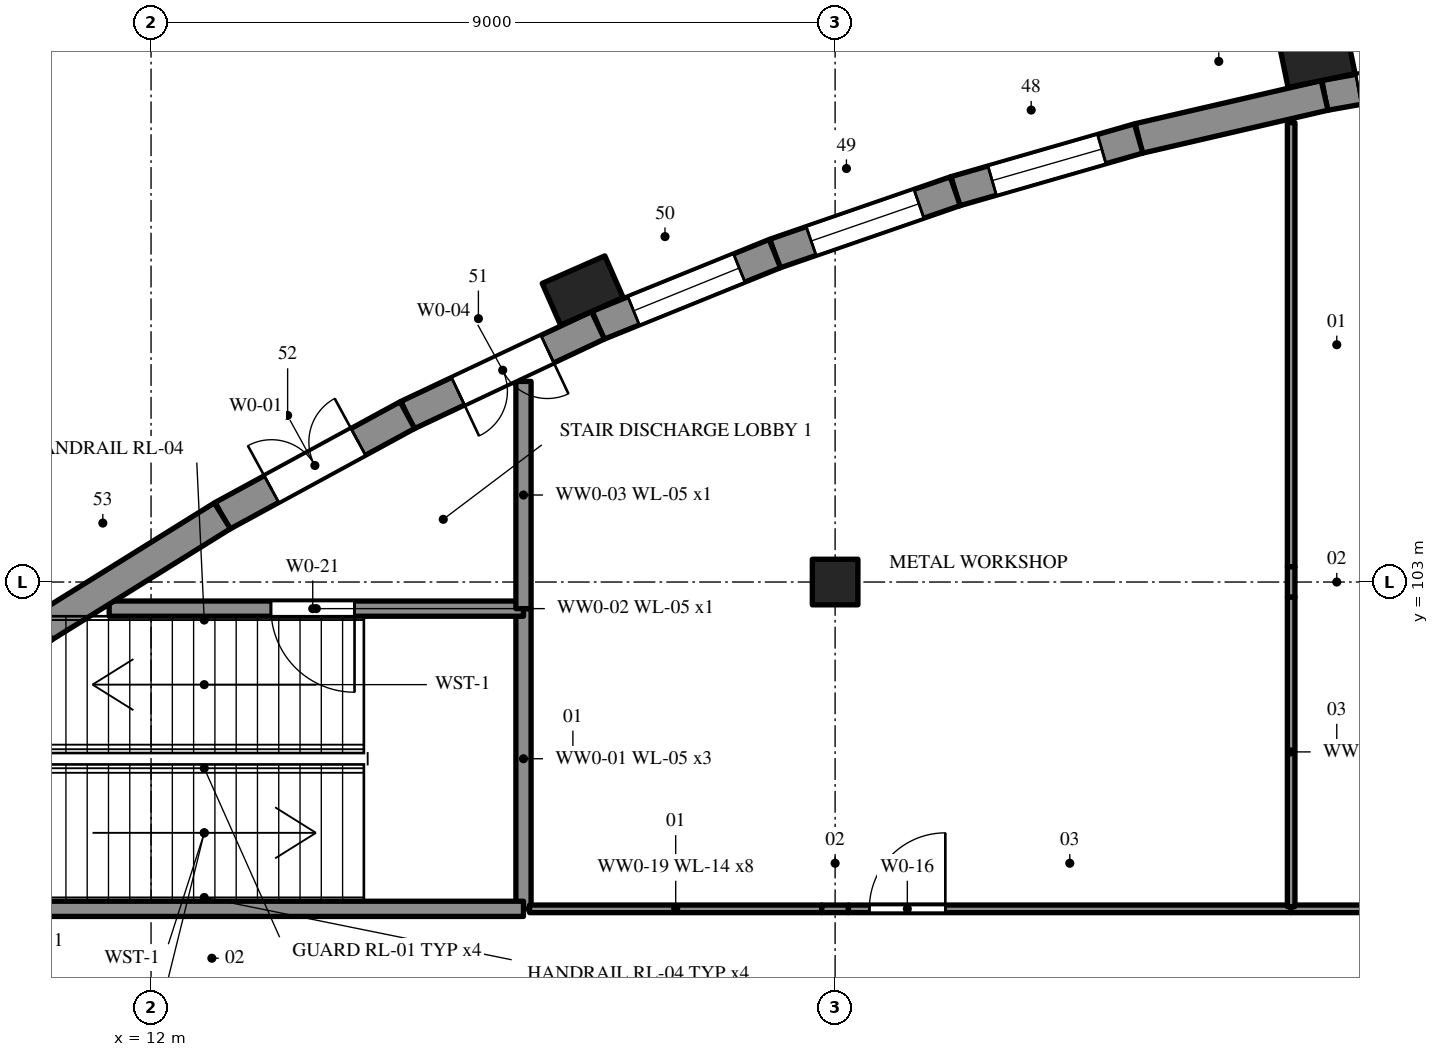
"""IFC4 building model, lengths in metres.
Left out: names, types, materials, properties, quantities, classifications, styles, units other than length and angle.
Written with IfcOpenShell. Run it as: python <this file> out.ifc"""

import sys

from ifc_helpers import new_model, si_unit, direction, frame, frame_2d, origin, origin_2d, place, context, subcontext, project, spatial, rectangle, extrude, element, fill, save


model = new_model("IFC4")
c1 = context("Model", 3, precision=1e-05, world=origin(), true_north=direction((0.0, 1.0)))
c2 = subcontext(c1, "Body", "Model", "MODEL_VIEW")
j1 = project(units=[si_unit("LENGTHUNIT", "METRE"), si_unit("PLANEANGLEUNIT", "RADIAN")], contexts=[c1])
p1 = place(None, origin())
s1 = spatial("IfcSite", under=j1, at=p1, CompositionType="ELEMENT")
p2 = place(p1, origin())
s2 = spatial("IfcBuilding", under=s1, at=p2, CompositionType="ELEMENT")
p3 = place(p2, origin())
s3 = spatial("IfcBuildingStorey", under=s2, at=p3, CompositionType="ELEMENT", Elevation=0.0)
p4 = place(p3, frame((21.0, 103.0, -0.25), z_axis=(0.0, 0.0, 1.0), x_axis=(1.0, 0.0, 0.0)))
e1 = element("IfcColumn", 1, at=p4, inside=s3, PredefinedType="COLUMN", context=c2, shape_type="SweptSolid", body=[
    extrude(rectangle(XDim=0.6, YDim=0.6, at=origin_2d()), origin(), (0.0, 0.0, 1.0), 5.37),
])
p5 = place(p3, frame((16.9, 102.65, -0.25), z_axis=(0.0, 0.0, 1.0), x_axis=(0.0, -1.0, 0.0)))
e2 = element("IfcWall", 2, at=p5, inside=s3, PredefinedType="SHEAR", context=c2, shape_type="SweptSolid", body=[
    extrude(rectangle(XDim=3.95, YDim=0.2, at=frame_2d((1.975, 0.0))), origin(), (0.0, 0.0, 1.0), 5.65),
])
p6 = place(p3, frame((16.9, 98.7, -0.25), z_axis=(0.0, 0.0, 1.0), x_axis=(-1.0, 0.0, 0.0)))
e3 = element("IfcWall", 3, at=p6, inside=s3, PredefinedType="SHEAR", context=c2, shape_type="SweptSolid", body=[
    extrude(rectangle(XDim=8.2, YDim=0.2, at=frame_2d((4.1, 0.0))), origin(), (0.0, 0.0, 1.0), 5.65),
])
p7 = place(p6, frame((6.95, 0.0, 0.25)))
e4 = element("IfcOpeningElement", 4, at=p7, cuts=e3, PredefinedType="OPENING", context=c2, shape_type="SweptSolid", body=[
    extrude(rectangle(XDim=1.0, YDim=2.4, at=frame_2d((0.5, 1.2))), frame((0.0, 0.11, 0.0), z_axis=(0.0, -1.0, 0.0), x_axis=(1.0, 0.0, 0.0)), (0.0, 0.0, 1.0), 0.22),
])
p8 = place(p3, frame((11.449, 102.65, -0.25), z_axis=(0.0, 0.0, 1.0), x_axis=(1.0, 0.0, 0.0)))
e5 = element("IfcWall", 5, at=p8, inside=s3, PredefinedType="SHEAR", context=c2, shape_type="SweptSolid", body=[
    extrude(rectangle(XDim=5.451, YDim=0.2, at=frame_2d((2.726, 0.0))), origin(), (0.0, 0.0, 1.0), 5.65),
])
p9 = place(p8, frame((2.128, 0.0, 0.25)))
e6 = element("IfcOpeningElement", 6, at=p9, cuts=e5, PredefinedType="OPENING", context=c2, shape_type="SweptSolid", body=[
    extrude(rectangle(XDim=1.1, YDim=2.1, at=frame_2d((0.55, 1.05))), frame((0.0, 0.11, 0.0), z_axis=(0.0, -1.0, 0.0), x_axis=(1.0, 0.0, 0.0)), (0.0, 0.0, 1.0), 0.22),
])
p10 = place(p3, frame((16.9, 105.64, -0.25), z_axis=(0.0, 0.0, 1.0), x_axis=(0.0, -1.0, 0.0)))
e7 = element("IfcWall", 7, at=p10, inside=s3, PredefinedType="SHEAR", context=c2, shape_type="SweptSolid", body=[
    extrude(rectangle(XDim=2.99, YDim=0.2, at=frame_2d((1.495, 0.0))), origin(), (0.0, 0.0, 1.0), 5.65),
])
p11 = place(p3, frame((29.809, 109.825, -0.25), z_axis=(0.0, 0.0, 1.0), x_axis=(-0.984524011381, -0.175249738987, 0.0)))
e8 = element("IfcWall", 8, at=p11, inside=s3, PredefinedType="SOLIDWALL", context=c2, shape_type="SweptSolid", body=[
    extrude(rectangle(XDim=2.406, YDim=0.4, at=frame_2d((1.203, 0.0))), origin(), (0.0, 0.0, 1.0), 5.65),
])
p12 = place(p11, frame((0.453, 0.0, 1.15)))
e9 = element("IfcOpeningElement", 9, at=p12, cuts=e8, PredefinedType="OPENING", context=c2, shape_type="SweptSolid", body=[
    extrude(rectangle(XDim=1.5, YDim=2.1, at=frame_2d((0.75, 1.05))), frame((0.0, 0.21, 0.0), z_axis=(0.0, -1.0, 0.0), x_axis=(1.0, 0.0, 0.0)), (0.0, 0.0, 1.0), 0.42),
])
p13 = place(p3, frame((27.44, 109.403, -0.25), z_axis=(0.0, 0.0, 1.0), x_axis=(-0.974189274843, -0.225732710925, 0.0)))
e10 = element("IfcWall", 10, at=p13, inside=s3, PredefinedType="SOLIDWALL", context=c2, shape_type="SweptSolid", body=[
    extrude(rectangle(XDim=2.511, YDim=0.4, at=frame_2d((1.256, 0.0))), origin(), (0.0, 0.0, 1.0), 5.65),
])
p14 = place(p3, frame((24.994, 108.836, -0.25), z_axis=(0.0, 0.0, 1.0), x_axis=(-0.961008605775, -0.276518461637, 0.0)))
e11 = element("IfcWall", 11, at=p14, inside=s3, PredefinedType="SOLIDWALL", context=c2, shape_type="SweptSolid", body=[
    extrude(rectangle(XDim=2.511, YDim=0.4, at=frame_2d((1.255, 0.0))), origin(), (0.0, 0.0, 1.0), 5.65),
])
p15 = place(p14, frame((0.506, 0.0, 1.15)))
e12 = element("IfcOpeningElement", 12, at=p15, cuts=e11, PredefinedType="OPENING", context=c2, shape_type="SweptSolid", body=[
    extrude(rectangle(XDim=1.5, YDim=2.1, at=frame_2d((0.75, 1.05))), frame((0.0, 0.21, 0.0), z_axis=(0.0, -1.0, 0.0), x_axis=(1.0, 0.0, 0.0)), (0.0, 0.0, 1.0), 0.42),
])
p16 = place(p3, frame((22.581, 108.142, -0.25), z_axis=(0.0, 0.0, 1.0), x_axis=(-0.945175475032, -0.326562890417, 0.0)))
e13 = element("IfcWall", 13, at=p16, inside=s3, PredefinedType="SOLIDWALL", context=c2, shape_type="SweptSolid", body=[
    extrude(rectangle(XDim=2.511, YDim=0.4, at=frame_2d((1.256, 0.0))), origin(), (0.0, 0.0, 1.0), 5.65),
])
p17 = place(p16, frame((0.506, 0.0, 1.15)))
e14 = element("IfcOpeningElement", 14, at=p17, cuts=e13, PredefinedType="OPENING", context=c2, shape_type="SweptSolid", body=[
    extrude(rectangle(XDim=1.5, YDim=2.1, at=frame_2d((0.75, 1.05))), frame((0.0, 0.21, 0.0), z_axis=(0.0, -1.0, 0.0), x_axis=(1.0, 0.0, 0.0)), (0.0, 0.0, 1.0), 0.42),
])
p18 = place(p3, frame((20.207, 107.322, -0.25), z_axis=(0.0, 0.0, 1.0), x_axis=(-0.926688932252, -0.375829246921, 0.0)))
e15 = element("IfcWall", 15, at=p18, inside=s3, PredefinedType="SOLIDWALL", context=c2, shape_type="SweptSolid", body=[
    extrude(rectangle(XDim=2.511, YDim=0.4, at=frame_2d((1.255, 0.0))), origin(), (0.0, 0.0, 1.0), 5.65),
])
p19 = place(p18, frame((0.505, 0.0, 1.15)))
e16 = element("IfcOpeningElement", 16, at=p19, cuts=e15, PredefinedType="OPENING", context=c2, shape_type="SweptSolid", body=[
    extrude(rectangle(XDim=1.5, YDim=2.1, at=frame_2d((0.75, 1.05))), frame((0.0, 0.21, 0.0), z_axis=(0.0, -1.0, 0.0), x_axis=(1.0, 0.0, 0.0)), (0.0, 0.0, 1.0), 0.42),
])
p20 = place(p3, frame((17.88, 106.378, -0.25), z_axis=(0.0, 0.0, 1.0), x_axis=(-0.904561064695, -0.42634408667, 0.0)))
e17 = element("IfcWall", 17, at=p20, inside=s3, PredefinedType="SOLIDWALL", context=c2, shape_type="SweptSolid", body=[
    extrude(rectangle(XDim=2.772, YDim=0.4, at=frame_2d((1.386, 0.0))), origin(), (0.0, 0.0, 1.0), 5.65),
])
p21 = place(p20, frame((0.736, 0.0, 0.25)))
e18 = element("IfcOpeningElement", 18, at=p21, cuts=e17, PredefinedType="OPENING", context=c2, shape_type="SweptSolid", body=[
    extrude(rectangle(XDim=1.3, YDim=2.1, at=frame_2d((0.65, 1.05))), frame((0.0, 0.21, 0.0), z_axis=(0.0, -1.0, 0.0), x_axis=(1.0, 0.0, 0.0)), (0.0, 0.0, 1.0), 0.42),
])
p22 = place(p3, frame((15.373, 105.196, -0.25), z_axis=(0.0, 0.0, 1.0), x_axis=(-0.878255502871, -0.478191668347, 0.0)))
e19 = element("IfcWall", 19, at=p22, inside=s3, PredefinedType="SOLIDWALL", context=c2, shape_type="SweptSolid", body=[
    extrude(rectangle(XDim=2.772, YDim=0.4, at=frame_2d((1.386, 0.0))), origin(), (0.0, 0.0, 1.0), 5.65),
])
p23 = place(p22, frame((0.736, 0.0, 0.25)))
e20 = element("IfcOpeningElement", 20, at=p23, cuts=e19, PredefinedType="OPENING", context=c2, shape_type="SweptSolid", body=[
    extrude(rectangle(XDim=1.3, YDim=2.1, at=frame_2d((0.65, 1.05))), frame((0.0, 0.21, 0.0), z_axis=(0.0, -1.0, 0.0), x_axis=(1.0, 0.0, 0.0)), (0.0, 0.0, 1.0), 0.42),
])
p24 = place(p3, frame((12.938, 103.871, -0.25), z_axis=(0.0, 0.0, 1.0), x_axis=(-0.84912946359, -0.528184772653, 0.0)))
e21 = element("IfcWall", 21, at=p24, inside=s3, PredefinedType="SOLIDWALL", context=c2, shape_type="SweptSolid", body=[
    extrude(rectangle(XDim=2.772, YDim=0.4, at=frame_2d((1.386, 0.0))), origin(), (0.0, 0.0, 1.0), 5.65),
])
for number, where, z_axis, x_axis in (
    (22, (17.679, 106.836, -0.25), (0.0, 0.0, 1.0), (-0.915, -0.403, 0.0)),
    (23, (27.34, 109.893, -0.25), (0.0, 0.0, 1.0), (-0.98, -0.201, 0.0)),
):
    element("IfcColumn", number, at=place(p3, frame(where, z_axis=z_axis, x_axis=x_axis)), inside=s3, PredefinedType="PILASTER", context=c2, shape_type="SweptSolid", body=[
        extrude(rectangle(XDim=0.9, YDim=0.6, at=origin_2d()), origin(), (0.0, 0.0, 1.0), 5.65),
    ])
p25 = place(p3, frame((16.98, 98.7, 0.0), z_axis=(0.0, 0.0, 1.0), x_axis=(1.0, 0.0, 0.0)))
e24 = element("IfcWall", 24, at=p25, inside=s3, PredefinedType="PARTITIONING", context=c2, shape_type="SweptSolid", body=[
    extrude(rectangle(XDim=3.845, YDim=0.1, at=frame_2d((1.922, 0.0))), origin(), (0.0, 0.0, 1.0), 5.12),
])
p26 = place(p3, frame((20.825, 98.7, 0.0), z_axis=(0.0, 0.0, 1.0), x_axis=(1.0, 0.0, 0.0)))
e25 = element("IfcWall", 25, at=p26, inside=s3, PredefinedType="PARTITIONING", context=c2, shape_type="SweptSolid", body=[
    extrude(rectangle(XDim=0.35, YDim=0.1, at=frame_2d((0.175, 0.0))), origin(), (0.0, 0.0, 1.0), 4.42),
])
p27 = place(p3, frame((21.175, 98.7, 0.0), z_axis=(0.0, 0.0, 1.0), x_axis=(1.0, 0.0, 0.0)))
e26 = element("IfcWall", 26, at=p27, inside=s3, PredefinedType="PARTITIONING", context=c2, shape_type="SweptSolid", body=[
    extrude(rectangle(XDim=5.825, YDim=0.1, at=frame_2d((2.913, 0.0))), origin(), (0.0, 0.0, 1.0), 5.12),
])
p28 = place(p27, frame((0.275, 0.0, 0.0)))
e27 = element("IfcOpeningElement", 27, at=p28, cuts=e26, PredefinedType="OPENING", context=c2, shape_type="SweptSolid", body=[
    extrude(rectangle(XDim=1.0, YDim=2.1, at=frame_2d((0.5, 1.05))), frame((0.0, 0.06, 0.0), z_axis=(0.0, -1.0, 0.0), x_axis=(1.0, 0.0, 0.0)), (0.0, 0.0, 1.0), 0.12),
])
p29 = place(p3, frame((27.0, 98.7, 0.0), z_axis=(0.0, 0.0, 1.0), x_axis=(1.0, 0.0, 0.0)))
e28 = element("IfcWall", 28, at=p29, inside=s3, PredefinedType="PARTITIONING", context=c2, shape_type="SweptSolid", body=[
    extrude(rectangle(XDim=2.825, YDim=0.1, at=frame_2d((1.413, 0.0))), origin(), (0.0, 0.0, 1.0), 5.12),
])
p30 = place(p3, frame((27.0, 109.044, 0.0), z_axis=(0.0, 0.0, 1.0), x_axis=(0.0, -1.0, 0.0)))
e29 = element("IfcWall", 29, at=p30, inside=s3, PredefinedType="PARTITIONING", context=c2, shape_type="SweptSolid", body=[
    extrude(rectangle(XDim=5.844, YDim=0.1, at=frame_2d((2.922, 0.0))), origin(), (0.0, 0.0, 1.0), 5.12),
])
p31 = place(p3, frame((27.0, 103.2, 0.0), z_axis=(0.0, 0.0, 1.0), x_axis=(0.0, -1.0, 0.0)))
e30 = element("IfcWall", 30, at=p31, inside=s3, PredefinedType="PARTITIONING", context=c2, shape_type="SweptSolid", body=[
    extrude(rectangle(XDim=0.4, YDim=0.1, at=frame_2d((0.2, 0.0))), origin(), (0.0, 0.0, 1.0), 4.32),
])
p32 = place(p3, frame((27.0, 102.8, 0.0), z_axis=(0.0, 0.0, 1.0), x_axis=(0.0, -1.0, 0.0)))
e31 = element("IfcWall", 31, at=p32, inside=s3, PredefinedType="PARTITIONING", context=c2, shape_type="SweptSolid", body=[
    extrude(rectangle(XDim=4.07, YDim=0.1, at=frame_2d((2.035, 0.0))), origin(), (0.0, 0.0, 1.0), 5.12),
])
p33 = place(p23, frame((1.3, 0.0, 0.0), z_axis=(0.0, 0.0, 1.0), x_axis=(-1.0, 0.0, 0.0)))
e32 = element("IfcDoor", 32, at=p33, inside=s3, OperationType="DOUBLE_DOOR_SINGLE_SWING", PredefinedType="DOOR", context=c2, shape_type="SweptSolid", body=[
    extrude(rectangle(XDim=1.3, YDim=2.1, at=frame_2d((0.65, 1.05))), frame((0.0, 0.025, 0.0), z_axis=(0.0, -1.0, 0.0), x_axis=(1.0, 0.0, 0.0)), (0.0, 0.0, 1.0), 0.05),
])
fill(e20, e32)
p34 = place(p21, origin())
e33 = element("IfcDoor", 33, at=p34, inside=s3, OperationType="DOUBLE_DOOR_SINGLE_SWING", PredefinedType="DOOR", context=c2, shape_type="SweptSolid", body=[
    extrude(rectangle(XDim=1.3, YDim=2.1, at=frame_2d((0.65, 1.05))), frame((0.0, 0.025, 0.0), z_axis=(0.0, -1.0, 0.0), x_axis=(1.0, 0.0, 0.0)), (0.0, 0.0, 1.0), 0.05),
])
fill(e18, e33)
p35 = place(p12, origin())
e34 = element("IfcWindow", 34, at=p35, inside=s3, PartitioningType="SINGLE_PANEL", PredefinedType="WINDOW", context=c2, shape_type="SweptSolid", body=[
    extrude(rectangle(XDim=1.5, YDim=2.1, at=frame_2d((0.75, 1.05))), frame((0.0, 0.03, 0.0), z_axis=(0.0, -1.0, 0.0), x_axis=(1.0, 0.0, 0.0)), (0.0, 0.0, 1.0), 0.06),
])
fill(e9, e34)
p36 = place(p15, origin())
e35 = element("IfcWindow", 35, at=p36, inside=s3, PartitioningType="SINGLE_PANEL", PredefinedType="WINDOW", context=c2, shape_type="SweptSolid", body=[
    extrude(rectangle(XDim=1.5, YDim=2.1, at=frame_2d((0.75, 1.05))), frame((0.0, 0.03, 0.0), z_axis=(0.0, -1.0, 0.0), x_axis=(1.0, 0.0, 0.0)), (0.0, 0.0, 1.0), 0.06),
])
fill(e12, e35)
p37 = place(p17, origin())
e36 = element("IfcWindow", 36, at=p37, inside=s3, PartitioningType="SINGLE_PANEL", PredefinedType="WINDOW", context=c2, shape_type="SweptSolid", body=[
    extrude(rectangle(XDim=1.5, YDim=2.1, at=frame_2d((0.75, 1.05))), frame((0.0, 0.03, 0.0), z_axis=(0.0, -1.0, 0.0), x_axis=(1.0, 0.0, 0.0)), (0.0, 0.0, 1.0), 0.06),
])
fill(e14, e36)
p38 = place(p19, origin())
e37 = element("IfcWindow", 37, at=p38, inside=s3, PartitioningType="SINGLE_PANEL", PredefinedType="WINDOW", context=c2, shape_type="SweptSolid", body=[
    extrude(rectangle(XDim=1.5, YDim=2.1, at=frame_2d((0.75, 1.05))), frame((0.0, 0.03, 0.0), z_axis=(0.0, -1.0, 0.0), x_axis=(1.0, 0.0, 0.0)), (0.0, 0.0, 1.0), 0.06),
])
fill(e16, e37)
p39 = place(p28, origin())
e38 = element("IfcDoor", 38, at=p39, inside=s3, OperationType="SINGLE_SWING_RIGHT", PredefinedType="DOOR", context=c2, shape_type="SweptSolid", body=[
    extrude(rectangle(XDim=1.0, YDim=2.1, at=frame_2d((0.5, 1.05))), frame((0.0, 0.025, 0.0), z_axis=(0.0, -1.0, 0.0), x_axis=(1.0, 0.0, 0.0)), (0.0, 0.0, 1.0), 0.05),
])
fill(e27, e38)
p40 = place(p9, frame((1.1, 0.0, 0.0), z_axis=(0.0, 0.0, 1.0), x_axis=(-1.0, 0.0, 0.0)))
e39 = element("IfcDoor", 39, at=p40, inside=s3, OperationType="SINGLE_SWING_LEFT", PredefinedType="DOOR", context=c2, shape_type="SweptSolid", body=[
    extrude(rectangle(XDim=1.1, YDim=2.1, at=frame_2d((0.55, 1.05))), frame((0.0, 0.025, 0.0), z_axis=(0.0, -1.0, 0.0), x_axis=(1.0, 0.0, 0.0)), (0.0, 0.0, 1.0), 0.05),
])
fill(e6, e39)
save(model, sys.argv[1])
